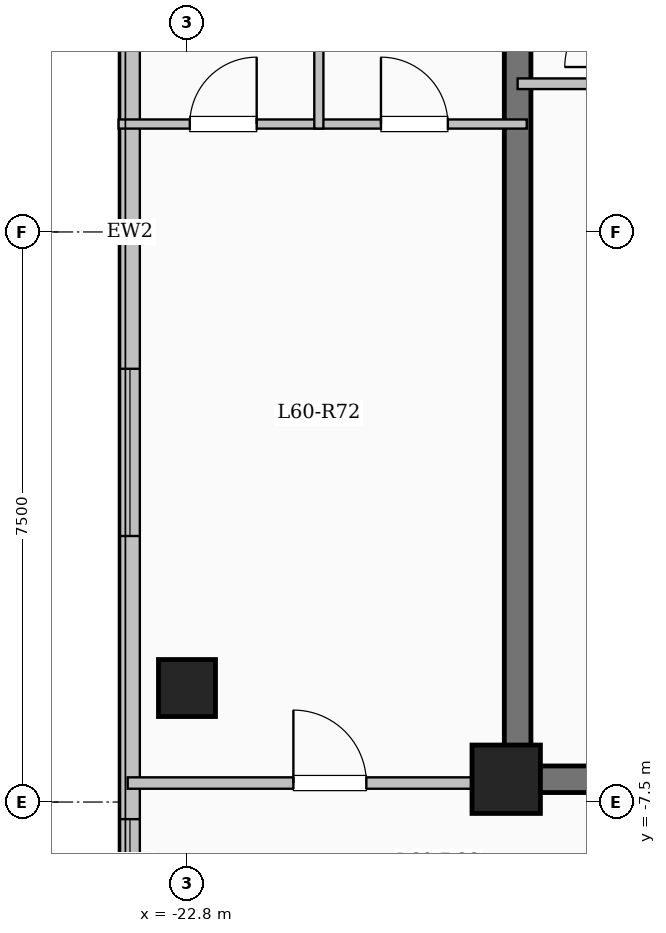
"""IFC4 building model, lengths in metres.
Left out: names, types, materials, properties, quantities, classifications, styles, units other than length and angle.
Written with IfcOpenShell. Run it as: python <this file> out.ifc"""

import sys

from ifc_helpers import new_model, si_unit, direction, frame, frame_2d, origin, origin_2d, place, context, subcontext, project, spatial, rectangle, extrude, element, fill, save


model = new_model("IFC4")
c1 = context("Model", 3, precision=1e-05, world=origin(), true_north=direction((0.0, 1.0)))
c2 = subcontext(c1, "Body", "Model", "MODEL_VIEW")
j1 = project(units=[si_unit("LENGTHUNIT", "METRE"), si_unit("PLANEANGLEUNIT", "RADIAN")], contexts=[c1])
p1 = place(None, origin())
s1 = spatial("IfcSite", under=j1, at=p1, CompositionType="ELEMENT")
p2 = place(p1, origin())
s2 = spatial("IfcBuilding", under=s1, at=p2, CompositionType="ELEMENT")
p3 = place(p2, frame((0.0, 0.0, 220.4)))
s3 = spatial("IfcBuildingStorey", under=s2, at=p3, CompositionType="ELEMENT", Elevation=220.4)
p4 = place(p3, frame((-18.6, -7.2, 0.0), z_axis=(0.0, 0.0, 1.0), x_axis=(1.0, 0.0, 0.0)))
e1 = element("IfcColumn", 1, at=p4, inside=s3, PredefinedType="COLUMN", context=c2, shape_type="SweptSolid", body=[
    extrude(rectangle(XDim=0.9, YDim=0.9, at=origin_2d()), origin(), (0.0, 0.0, 1.0), 3.35),
])
p5 = place(p3, frame((-22.8, -6.0, 0.0), z_axis=(0.0, 0.0, 1.0), x_axis=(1.0, 0.0, 0.0)))
e2 = element("IfcColumn", 2, at=p5, inside=s3, PredefinedType="COLUMN", context=c2, shape_type="SweptSolid", body=[
    extrude(rectangle(XDim=0.75, YDim=0.75, at=origin_2d()), origin(), (0.0, 0.0, 1.0), 3.35),
])
p6 = place(p3, frame((-23.55, -17.25, 0.0), z_axis=(0.0, 0.0, 1.0), x_axis=(0.0, 1.0, 0.0)))
e3 = element("IfcWall", 3, at=p6, inside=s3, PredefinedType="SOLIDWALL", context=c2, shape_type="SweptSolid", body=[
    extrude(rectangle(XDim=34.5, YDim=0.26, at=frame_2d((17.25, 0.0))), origin(), (0.0, 0.0, 1.0), 3.1),
])
p7 = place(p6, frame((2.825, 0.0, 0.9)))
e4 = element("IfcOpeningElement", 4, at=p7, cuts=e3, PredefinedType="OPENING", context=c2, shape_type="SweptSolid", body=[
    extrude(rectangle(XDim=2.2, YDim=1.75, at=frame_2d((1.1, 0.875))), frame((0.0, 0.14, 0.0), z_axis=(0.0, -1.0, 0.0), x_axis=(1.0, 0.0, 0.0)), (0.0, 0.0, 1.0), 0.28),
])
p8 = place(p6, frame((8.325, 0.0, 0.95)))
e5 = element("IfcOpeningElement", 5, at=p8, cuts=e3, PredefinedType="OPENING", context=c2, shape_type="SweptSolid", body=[
    extrude(rectangle(XDim=1.2, YDim=1.5, at=frame_2d((0.6, 0.75))), frame((0.0, 0.14, 0.0), z_axis=(0.0, -1.0, 0.0), x_axis=(1.0, 0.0, 0.0)), (0.0, 0.0, 1.0), 0.28),
])
p9 = place(p6, frame((13.25, 0.0, 0.9)))
e6 = element("IfcOpeningElement", 6, at=p9, cuts=e3, PredefinedType="OPENING", context=c2, shape_type="SweptSolid", body=[
    extrude(rectangle(XDim=2.2, YDim=1.75, at=frame_2d((1.1, 0.875))), frame((0.0, 0.14, 0.0), z_axis=(0.0, -1.0, 0.0), x_axis=(1.0, 0.0, 0.0)), (0.0, 0.0, 1.0), 0.28),
])
p10 = place(p6, frame((19.65, 0.0, 0.9)))
e7 = element("IfcOpeningElement", 7, at=p10, cuts=e3, PredefinedType="OPENING", context=c2, shape_type="SweptSolid", body=[
    extrude(rectangle(XDim=1.65, YDim=1.6, at=frame_2d((0.825, 0.8))), frame((0.0, 0.14, 0.0), z_axis=(0.0, -1.0, 0.0), x_axis=(1.0, 0.0, 0.0)), (0.0, 0.0, 1.0), 0.28),
])
p11 = place(p6, frame((24.125, 0.0, 0.9)))
e8 = element("IfcOpeningElement", 8, at=p11, cuts=e3, PredefinedType="OPENING", context=c2, shape_type="SweptSolid", body=[
    extrude(rectangle(XDim=2.0, YDim=1.7, at=frame_2d((1.0, 0.85))), frame((0.0, 0.14, 0.0), z_axis=(0.0, -1.0, 0.0), x_axis=(1.0, 0.0, 0.0)), (0.0, 0.0, 1.0), 0.28),
])
p12 = place(p6, frame((28.375, 0.0, 0.95)))
e9 = element("IfcOpeningElement", 9, at=p12, cuts=e3, PredefinedType="OPENING", context=c2, shape_type="SweptSolid", body=[
    extrude(rectangle(XDim=1.0, YDim=1.5, at=frame_2d((0.5, 0.75))), frame((0.0, 0.14, 0.0), z_axis=(0.0, -1.0, 0.0), x_axis=(1.0, 0.0, 0.0)), (0.0, 0.0, 1.0), 0.28),
])
p13 = place(p6, frame((31.125, 0.0, 0.9)))
e10 = element("IfcOpeningElement", 10, at=p13, cuts=e3, PredefinedType="OPENING", context=c2, shape_type="SweptSolid", body=[
    extrude(rectangle(XDim=2.0, YDim=1.7, at=frame_2d((1.0, 0.85))), frame((0.0, 0.14, 0.0), z_axis=(0.0, -1.0, 0.0), x_axis=(1.0, 0.0, 0.0)), (0.0, 0.0, 1.0), 0.28),
])
p14 = place(p3, frame((-18.45, -7.375, 0.0), z_axis=(0.0, 0.0, 1.0), x_axis=(0.0, 1.0, 0.0)))
e11 = element("IfcWall", 11, at=p14, inside=s3, PredefinedType="SHEAR", context=c2, shape_type="SweptSolid", body=[
    extrude(rectangle(XDim=14.05, YDim=0.35, at=frame_2d((7.025, 0.0))), origin(), (0.0, 0.0, 1.0), 3.35),
])
p15 = place(p3, frame((-18.625, -7.2, 0.0), z_axis=(0.0, 0.0, 1.0), x_axis=(1.0, 0.0, 0.0)))
e12 = element("IfcWall", 12, at=p15, inside=s3, PredefinedType="SHEAR", context=c2, shape_type="SweptSolid", body=[
    extrude(rectangle(XDim=6.0, YDim=0.35, at=frame_2d((3.0, 0.0))), origin(), (0.0, 0.0, 1.0), 3.35),
])
p16 = place(p15, frame((1.725, 0.0, 0.0)))
e13 = element("IfcOpeningElement", 13, at=p16, cuts=e12, PredefinedType="OPENING", context=c2, shape_type="SweptSolid", body=[
    extrude(rectangle(XDim=1.12, YDim=2.15, at=frame_2d((0.56, 1.075))), frame((0.0, 0.185, 0.0), z_axis=(0.0, -1.0, 0.0), x_axis=(1.0, 0.0, 0.0)), (0.0, 0.0, 1.0), 0.37),
])
p17 = place(p3, frame((-18.45, 1.95, 0.0), z_axis=(0.0, 0.0, 1.0), x_axis=(1.0, 0.0, 0.0)))
e14 = element("IfcWall", 14, at=p17, inside=s3, PredefinedType="PARTITIONING", context=c2, shape_type="SweptSolid", body=[
    extrude(rectangle(XDim=3.15, YDim=0.14, at=frame_2d((1.575, 0.0))), origin(), (0.0, 0.0, 1.0), 3.1),
])
p18 = place(p17, frame((1.9, 0.0, 0.0)))
e15 = element("IfcOpeningElement", 15, at=p18, cuts=e14, PredefinedType="OPENING", context=c2, shape_type="SweptSolid", body=[
    extrude(rectangle(XDim=0.88, YDim=2.1, at=frame_2d((0.44, 1.05))), frame((0.0, 0.08, 0.0), z_axis=(0.0, -1.0, 0.0), x_axis=(1.0, 0.0, 0.0)), (0.0, 0.0, 1.0), 0.16),
])
p19 = place(p3, frame((-23.58, -7.25, 0.0), z_axis=(0.0, 0.0, 1.0), x_axis=(1.0, 0.0, 0.0)))
e16 = element("IfcWall", 16, at=p19, inside=s3, PredefinedType="PARTITIONING", context=c2, shape_type="SweptSolid", body=[
    extrude(rectangle(XDim=5.13, YDim=0.15, at=frame_2d((2.565, 0.0))), origin(), (0.0, 0.0, 1.0), 3.1),
])
p20 = place(p19, frame((2.18, 0.0, 0.0)))
e17 = element("IfcOpeningElement", 17, at=p20, cuts=e16, PredefinedType="OPENING", context=c2, shape_type="SweptSolid", body=[
    extrude(rectangle(XDim=0.96, YDim=2.15, at=frame_2d((0.48, 1.075))), frame((0.0, 0.085, 0.0), z_axis=(0.0, -1.0, 0.0), x_axis=(1.0, 0.0, 0.0)), (0.0, 0.0, 1.0), 0.17),
])
p21 = place(p3, frame((-23.7, 1.42, 0.0), z_axis=(0.0, 0.0, 1.0), x_axis=(1.0, 0.0, 0.0)))
e18 = element("IfcWall", 18, at=p21, inside=s3, PredefinedType="PARTITIONING", context=c2, shape_type="SweptSolid", body=[
    extrude(rectangle(XDim=5.37, YDim=0.12, at=frame_2d((2.685, 0.0))), origin(), (0.0, 0.0, 1.0), 3.1),
])
p22 = place(p21, frame((0.937, 0.0, 0.0)))
e19 = element("IfcOpeningElement", 19, at=p22, cuts=e18, PredefinedType="OPENING", context=c2, shape_type="SweptSolid", body=[
    extrude(rectangle(XDim=0.88, YDim=2.1, at=frame_2d((0.44, 1.05))), frame((0.0, 0.07, 0.0), z_axis=(0.0, -1.0, 0.0), x_axis=(1.0, 0.0, 0.0)), (0.0, 0.0, 1.0), 0.14),
])
p23 = place(p21, frame((3.452, 0.0, 0.0)))
e20 = element("IfcOpeningElement", 20, at=p23, cuts=e18, PredefinedType="OPENING", context=c2, shape_type="SweptSolid", body=[
    extrude(rectangle(XDim=0.88, YDim=2.1, at=frame_2d((0.44, 1.05))), frame((0.0, 0.07, 0.0), z_axis=(0.0, -1.0, 0.0), x_axis=(1.0, 0.0, 0.0)), (0.0, 0.0, 1.0), 0.14),
])
p24 = place(p3, frame((-21.065, 1.36, 0.0), z_axis=(0.0, 0.0, 1.0), x_axis=(0.0, 1.0, 0.0)))
e21 = element("IfcWall", 21, at=p24, inside=s3, PredefinedType="PARTITIONING", context=c2, shape_type="SweptSolid", body=[
    extrude(rectangle(XDim=3.58, YDim=0.12, at=frame_2d((1.79, 0.0))), origin(), (0.0, 0.0, 1.0), 3.1),
])
p25 = place(p8, origin())
e22 = element("IfcWindow", 22, at=p25, inside=s3, PartitioningType="SINGLE_PANEL", PredefinedType="WINDOW", context=c2, shape_type="SweptSolid", body=[
    extrude(rectangle(XDim=1.2, YDim=1.5, at=frame_2d((0.6, 0.75))), frame((0.0, 0.03, 0.0), z_axis=(0.0, -1.0, 0.0), x_axis=(1.0, 0.0, 0.0)), (0.0, 0.0, 1.0), 0.06),
])
fill(e5, e22)
p26 = place(p9, origin())
e23 = element("IfcWindow", 23, at=p26, inside=s3, PartitioningType="SINGLE_PANEL", PredefinedType="WINDOW", context=c2, shape_type="SweptSolid", body=[
    extrude(rectangle(XDim=2.2, YDim=1.75, at=frame_2d((1.1, 0.875))), frame((0.0, 0.03, 0.0), z_axis=(0.0, -1.0, 0.0), x_axis=(1.0, 0.0, 0.0)), (0.0, 0.0, 1.0), 0.06),
])
fill(e6, e23)
p27 = place(p20, origin())
e24 = element("IfcDoor", 24, at=p27, inside=s3, OperationType="SINGLE_SWING_LEFT", PredefinedType="DOOR", context=c2, shape_type="SweptSolid", body=[
    extrude(rectangle(XDim=0.96, YDim=2.15, at=frame_2d((0.48, 1.075))), frame((0.0, 0.025, 0.0), z_axis=(0.0, -1.0, 0.0), x_axis=(1.0, 0.0, 0.0)), (0.0, 0.0, 1.0), 0.05),
])
fill(e17, e24)
p28 = place(p22, origin())
e25 = element("IfcDoor", 25, at=p28, inside=s3, OperationType="SINGLE_SWING_RIGHT", PredefinedType="DOOR", context=c2, shape_type="SweptSolid", body=[
    extrude(rectangle(XDim=0.88, YDim=2.1, at=frame_2d((0.44, 1.05))), frame((0.0, 0.025, 0.0), z_axis=(0.0, -1.0, 0.0), x_axis=(1.0, 0.0, 0.0)), (0.0, 0.0, 1.0), 0.05),
])
fill(e19, e25)
p29 = place(p23, origin())
e26 = element("IfcDoor", 26, at=p29, inside=s3, OperationType="SINGLE_SWING_LEFT", PredefinedType="DOOR", context=c2, shape_type="SweptSolid", body=[
    extrude(rectangle(XDim=0.88, YDim=2.1, at=frame_2d((0.44, 1.05))), frame((0.0, 0.025, 0.0), z_axis=(0.0, -1.0, 0.0), x_axis=(1.0, 0.0, 0.0)), (0.0, 0.0, 1.0), 0.05),
])
fill(e20, e26)
save(model, sys.argv[1])
